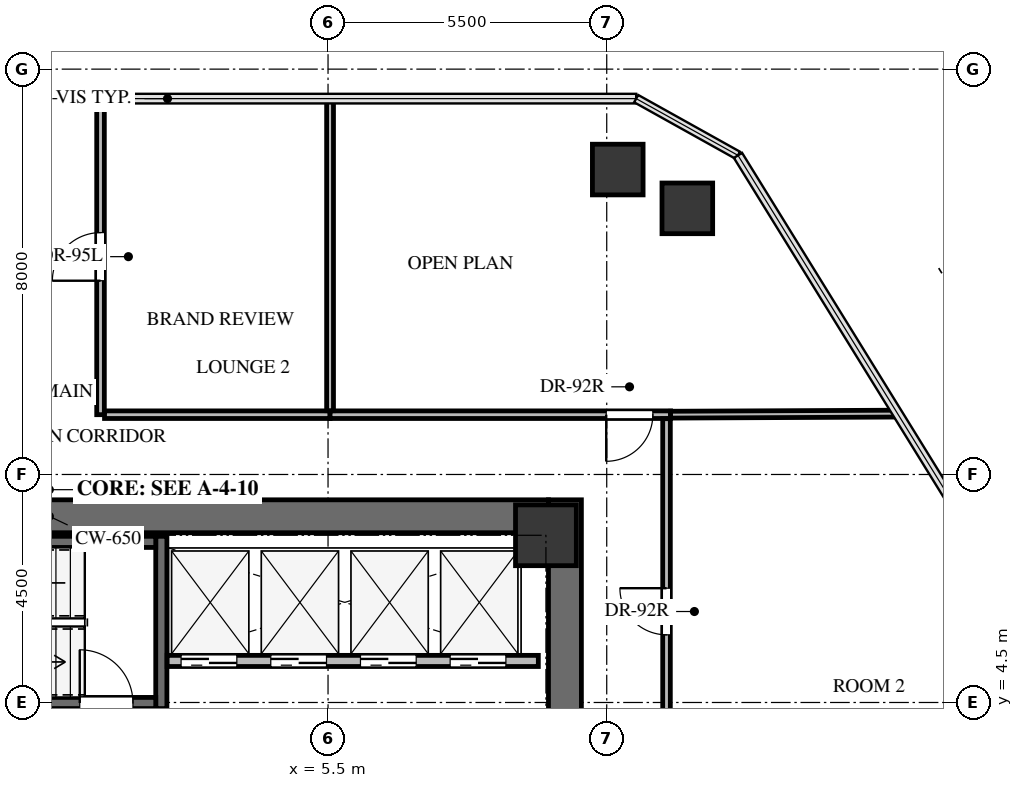
"""IFC4 building model, lengths in metres.
Left out: names, types, materials, properties, quantities, classifications, styles, units other than length and angle.
Written with IfcOpenShell. Run it as: python <this file> out.ifc"""

import sys

from ifc_helpers import new_model, si_unit, direction, frame, frame_2d, origin, origin_2d, place, context, subcontext, project, spatial, rectangle, extrude, source, transform, mapped, element, fill, save


model = new_model("IFC4")
c1 = context("Model", 3, precision=1e-05, world=origin(), true_north=direction((0.0, 1.0)))
c2 = subcontext(c1, "Body", "Model", "MODEL_VIEW")
j1 = project(units=[si_unit("LENGTHUNIT", "METRE"), si_unit("PLANEANGLEUNIT", "RADIAN")], contexts=[c1])
p1 = place(None, origin())
s1 = spatial("IfcSite", under=j1, at=p1, CompositionType="ELEMENT")
p2 = place(p1, origin())
s2 = spatial("IfcBuilding", under=s1, at=p2, CompositionType="ELEMENT")
p3 = place(p2, frame((0.0, 0.0, 190.3)))
s3 = spatial("IfcBuildingStorey", under=s2, at=p3, CompositionType="ELEMENT", Elevation=190.3)
p4 = place(p3, frame((10.175, -8.5, 0.0), z_axis=(0.0, 0.0, 1.0), x_axis=(0.0, 1.0, 0.0)))
e1 = element("IfcWall", 1, at=p4, inside=s3, PredefinedType="SHEAR", context=c2, shape_type="SweptSolid", body=[
    extrude(rectangle(XDim=17.0, YDim=0.65, at=frame_2d((8.5, 0.0))), origin(), (0.0, 0.0, 1.0), 3.3),
])
p5 = place(p3, frame((-9.85, 8.175, 0.0), z_axis=(0.0, 0.0, 1.0), x_axis=(1.0, 0.0, 0.0)))
e2 = element("IfcWall", 2, at=p5, inside=s3, PredefinedType="SHEAR", context=c2, shape_type="SweptSolid", body=[
    extrude(rectangle(XDim=19.7, YDim=0.65, at=frame_2d((9.85, 0.0))), origin(), (0.0, 0.0, 1.0), 3.3),
])
p6 = place(p3, frame((2.21, 4.38, -0.24), z_axis=(0.0, 0.0, 1.0), x_axis=(0.0, 1.0, 0.0)))
e3 = element("IfcWall", 3, at=p6, inside=s3, PredefinedType="SHEAR", context=c2, shape_type="SweptSolid", body=[
    extrude(rectangle(XDim=3.4, YDim=0.22, at=frame_2d((1.7, 0.0))), origin(), (0.0, 0.0, 1.0), 3.3),
])
p7 = place(p3, frame((-5.25, 4.49, -0.24), z_axis=(0.0, 0.0, 1.0), x_axis=(1.0, 0.0, 0.0)))
e4 = element("IfcWall", 4, at=p7, inside=s3, PredefinedType="SHEAR", context=c2, shape_type="SweptSolid", body=[
    extrude(rectangle(XDim=7.35, YDim=0.22, at=frame_2d((3.675, 0.0))), origin(), (0.0, 0.0, 1.0), 3.3),
])
p8 = place(p7, frame((5.85, 0.0, 0.0)))
e5 = element("IfcOpeningElement", 5, at=p8, cuts=e4, PredefinedType="OPENING", context=c2, shape_type="SweptSolid", body=[
    extrude(rectangle(XDim=1.05, YDim=2.15, at=frame_2d((0.525, 1.075))), frame((0.0, 0.12, 0.0), z_axis=(0.0, -1.0, 0.0), x_axis=(1.0, 0.0, 0.0)), (0.0, 0.0, 1.0), 0.24),
])
p9 = place(p3, frame((2.1, 7.67, -0.24), z_axis=(0.0, 0.0, 1.0), x_axis=(-1.0, 0.0, 0.0)))
e6 = element("IfcWall", 6, at=p9, inside=s3, PredefinedType="SHEAR", context=c2, shape_type="SweptSolid", body=[
    extrude(rectangle(XDim=7.35, YDim=0.22, at=frame_2d((3.675, 0.0))), origin(), (0.0, 0.0, 1.0), 3.3),
])
m1 = source(origin(), c2, "Body", "SweptSolid", [
    extrude(rectangle(XDim=1.2, YDim=1.2, at=origin_2d()), origin(), (0.0, 0.0, 1.0), 3.3),
])
p10 = place(p3, frame((9.8, 7.8, -0.24), z_axis=(0.0, 0.0, 1.0), x_axis=(1.0, 0.0, 0.0)))
e7 = element("IfcColumn", 7, at=p10, inside=s3, PredefinedType="COLUMN", context=c2, shape_type="MappedRepresentation", body=[
    mapped(m1, transform((0.0, 0.0, 0.0), x_axis=(1.0, 0.0, 0.0), y_axis=(0.0, 1.0, 0.0), z_axis=(0.0, 0.0, 1.0), scale=1.0)),
])
m2 = source(origin(), c2, "Body", "SweptSolid", [
    extrude(rectangle(XDim=1.0, YDim=1.0, at=origin_2d()), origin(), (0.0, 0.0, 1.0), 3.3),
])
for number, where, z_axis, x_axis in (
    (8, (11.218, 15.018, -0.24), (0.0, 0.0, 1.0), (1.0, 0.0, 0.0)),
    (9, (12.591, 14.252, -0.24), (0.0, 0.0, 1.0), (1.0, 0.0, 0.0)),
):
    element("IfcColumn", number, at=place(p3, frame(where, z_axis=z_axis, x_axis=x_axis)), inside=s3, PredefinedType="COLUMN", context=c2, shape_type="MappedRepresentation", body=[
        mapped(m2, transform((0.0, 0.0, 0.0), x_axis=(1.0, 0.0, 0.0), y_axis=(0.0, 1.0, 0.0), z_axis=(0.0, 0.0, 1.0), scale=1.0)),
    ])
p11 = place(p3, frame((2.325, 5.32, 0.0), z_axis=(0.0, 0.0, 1.0), x_axis=(1.0, 0.0, 0.0)))
e10 = element("IfcWall", 10, at=p11, inside=s3, PredefinedType="SOLIDWALL", context=c2, shape_type="SweptSolid", body=[
    extrude(rectangle(XDim=7.325, YDim=0.22, at=frame_2d((3.663, 0.0))), origin(), (0.0, 0.0, 1.0), 3.045),
])
p12 = place(p11, frame((0.275, 0.0, 0.0)))
e11 = element("IfcOpeningElement", 11, at=p12, cuts=e10, PredefinedType="OPENING", context=c2, shape_type="SweptSolid", body=[
    extrude(rectangle(XDim=1.1, YDim=2.15, at=frame_2d((0.55, 1.075))), frame((0.0, 0.12, 0.0), z_axis=(0.0, -1.0, 0.0), x_axis=(1.0, 0.0, 0.0)), (0.0, 0.0, 1.0), 0.24),
])
p13 = place(p11, frame((2.045, 0.0, 0.0)))
e12 = element("IfcOpeningElement", 12, at=p13, cuts=e10, PredefinedType="OPENING", context=c2, shape_type="SweptSolid", body=[
    extrude(rectangle(XDim=1.1, YDim=2.15, at=frame_2d((0.55, 1.075))), frame((0.0, 0.12, 0.0), z_axis=(0.0, -1.0, 0.0), x_axis=(1.0, 0.0, 0.0)), (0.0, 0.0, 1.0), 0.24),
])
p14 = place(p11, frame((3.815, 0.0, 0.0)))
e13 = element("IfcOpeningElement", 13, at=p14, cuts=e10, PredefinedType="OPENING", context=c2, shape_type="SweptSolid", body=[
    extrude(rectangle(XDim=1.1, YDim=2.15, at=frame_2d((0.55, 1.075))), frame((0.0, 0.12, 0.0), z_axis=(0.0, -1.0, 0.0), x_axis=(1.0, 0.0, 0.0)), (0.0, 0.0, 1.0), 0.24),
])
p15 = place(p11, frame((5.585, 0.0, 0.0)))
e14 = element("IfcOpeningElement", 14, at=p15, cuts=e10, PredefinedType="OPENING", context=c2, shape_type="SweptSolid", body=[
    extrude(rectangle(XDim=1.1, YDim=2.15, at=frame_2d((0.55, 1.075))), frame((0.0, 0.12, 0.0), z_axis=(0.0, -1.0, 0.0), x_axis=(1.0, 0.0, 0.0)), (0.0, 0.0, 1.0), 0.24),
])
p16 = place(p3, frame((1.01, 10.18, 0.0), z_axis=(0.0, 0.0, 1.0), x_axis=(0.0, 1.0, 0.0)))
e15 = element("IfcWall", 15, at=p16, inside=s3, PredefinedType="PARTITIONING", context=c2, shape_type="SweptSolid", body=[
    extrude(rectangle(XDim=6.238, YDim=0.15, at=frame_2d((3.119, 0.0))), origin(), (0.0, 0.0, 1.0), 2.399),
])
p17 = place(p16, frame((2.644, 0.0, 0.0)))
e16 = element("IfcOpeningElement", 16, at=p17, cuts=e15, PredefinedType="OPENING", context=c2, shape_type="SweptSolid", body=[
    extrude(rectangle(XDim=0.95, YDim=2.1, at=frame_2d((0.475, 1.05))), frame((0.0, 0.085, 0.0), z_axis=(0.0, -1.0, 0.0), x_axis=(1.0, 0.0, 0.0)), (0.0, 0.0, 1.0), 0.17),
])
p18 = place(p3, frame((5.54, 10.18, 0.0), z_axis=(0.0, 0.0, 1.0), x_axis=(-1.0, 0.0, 0.0)))
e17 = element("IfcWall", 17, at=p18, inside=s3, PredefinedType="PARTITIONING", context=c2, shape_type="SweptSolid", body=[
    extrude(rectangle(XDim=4.451, YDim=0.15, at=frame_2d((2.226, 0.0))), origin(), (0.0, 0.0, 1.0), 2.608),
])
p19 = place(p3, frame((12.26, 10.18, 0.0), z_axis=(0.0, 0.0, 1.0), x_axis=(-1.0, 0.0, 0.0)))
e18 = element("IfcWall", 18, at=p19, inside=s3, PredefinedType="PARTITIONING", context=c2, shape_type="SweptSolid", body=[
    extrude(rectangle(XDim=6.72, YDim=0.15, at=frame_2d((3.36, 0.0))), origin(), (0.0, 0.0, 1.0), 2.242),
])
p20 = place(p19, frame((0.35, 0.0, 0.0)))
e19 = element("IfcOpeningElement", 19, at=p20, cuts=e18, PredefinedType="OPENING", context=c2, shape_type="SweptSolid", body=[
    extrude(rectangle(XDim=0.92, YDim=2.1, at=frame_2d((0.46, 1.05))), frame((0.0, 0.085, 0.0), z_axis=(0.0, -1.0, 0.0), x_axis=(1.0, 0.0, 0.0)), (0.0, 0.0, 1.0), 0.17),
])
p21 = place(p3, frame((12.18, 2.49, 0.0), z_axis=(0.0, 0.0, 1.0), x_axis=(0.0, 1.0, 0.0)))
e20 = element("IfcWall", 20, at=p21, inside=s3, PredefinedType="PARTITIONING", context=c2, shape_type="SweptSolid", body=[
    extrude(rectangle(XDim=7.611, YDim=0.15, at=frame_2d((3.806, 0.0))), origin(), (0.0, 0.0, 1.0), 3.045),
])
p22 = place(p21, frame((3.345, 0.0, 0.0)))
e21 = element("IfcOpeningElement", 21, at=p22, cuts=e20, PredefinedType="OPENING", context=c2, shape_type="SweptSolid", body=[
    extrude(rectangle(XDim=0.92, YDim=2.1, at=frame_2d((0.46, 1.05))), frame((0.0, 0.085, 0.0), z_axis=(0.0, -1.0, 0.0), x_axis=(1.0, 0.0, 0.0)), (0.0, 0.0, 1.0), 0.17),
])
p23 = place(p3, frame((5.54, 16.418, 0.0), z_axis=(0.0, 0.0, 1.0), x_axis=(0.0, -1.0, 0.0)))
e22 = element("IfcWall", 22, at=p23, inside=s3, PredefinedType="PARTITIONING", context=c2, shape_type="SweptSolid", body=[
    extrude(rectangle(XDim=6.159, YDim=0.135, at=frame_2d((3.08, 0.0))), origin(), (0.0, 0.0, 1.0), 2.399),
])
p24 = place(p3, frame((16.74, 10.201, 0.0), z_axis=(0.0, 0.0, 1.0), x_axis=(-0.999989522694, -0.004577608714, 0.0)))
e23 = element("IfcWall", 23, at=p24, inside=s3, PredefinedType="PARTITIONING", context=c2, shape_type="SweptSolid", body=[
    extrude(rectangle(XDim=4.48, YDim=0.135, at=frame_2d((2.24, 0.0))), origin(), (0.0, 0.0, 1.0), 2.399),
])
m3 = source(origin(), c2, "Body", "SweptSolid", [
    extrude(rectangle(XDim=1.05, YDim=2.15, at=frame_2d((0.525, 1.075))), frame((0.0, 0.025, 0.0), z_axis=(0.0, -1.0, 0.0), x_axis=(1.0, 0.0, 0.0)), (0.0, 0.0, 1.0), 0.05),
])
p25 = place(p8, origin())
e24 = element("IfcDoor", 24, at=p25, inside=s3, OperationType="SINGLE_SWING_LEFT", PredefinedType="DOOR", context=c2, shape_type="MappedRepresentation", body=[
    mapped(m3, transform((0.0, 0.0, 0.0), x_axis=(1.0, 0.0, 0.0), y_axis=(0.0, 1.0, 0.0), z_axis=(0.0, 0.0, 1.0), scale=1.0)),
])
fill(e5, e24)
m4 = source(origin(), c2, "Body", "SweptSolid", [
    extrude(rectangle(XDim=1.1, YDim=2.15, at=frame_2d((0.55, 1.075))), frame((0.0, 0.025, 0.0), z_axis=(0.0, -1.0, 0.0), x_axis=(1.0, 0.0, 0.0)), (0.0, 0.0, 1.0), 0.05),
])
p26 = place(p12, origin())
e25 = element("IfcDoor", 25, at=p26, inside=s3, OperationType="DOUBLE_DOOR_SLIDING", PredefinedType="DOOR", context=c2, shape_type="MappedRepresentation", body=[
    mapped(m4, transform((0.0, 0.0, 0.0), x_axis=(1.0, 0.0, 0.0), y_axis=(0.0, 1.0, 0.0), z_axis=(0.0, 0.0, 1.0), scale=1.0)),
])
fill(e11, e25)
p27 = place(p13, origin())
e26 = element("IfcDoor", 26, at=p27, inside=s3, OperationType="DOUBLE_DOOR_SLIDING", PredefinedType="DOOR", context=c2, shape_type="MappedRepresentation", body=[
    mapped(m4, transform((0.0, 0.0, 0.0), x_axis=(1.0, 0.0, 0.0), y_axis=(0.0, 1.0, 0.0), z_axis=(0.0, 0.0, 1.0), scale=1.0)),
])
fill(e12, e26)
p28 = place(p14, origin())
e27 = element("IfcDoor", 27, at=p28, inside=s3, OperationType="DOUBLE_DOOR_SLIDING", PredefinedType="DOOR", context=c2, shape_type="MappedRepresentation", body=[
    mapped(m4, transform((0.0, 0.0, 0.0), x_axis=(1.0, 0.0, 0.0), y_axis=(0.0, 1.0, 0.0), z_axis=(0.0, 0.0, 1.0), scale=1.0)),
])
fill(e13, e27)
p29 = place(p15, origin())
e28 = element("IfcDoor", 28, at=p29, inside=s3, OperationType="DOUBLE_DOOR_SLIDING", PredefinedType="DOOR", context=c2, shape_type="MappedRepresentation", body=[
    mapped(m4, transform((0.0, 0.0, 0.0), x_axis=(1.0, 0.0, 0.0), y_axis=(0.0, 1.0, 0.0), z_axis=(0.0, 0.0, 1.0), scale=1.0)),
])
fill(e14, e28)
m5 = source(origin(), c2, "Body", "SweptSolid", [
    extrude(rectangle(XDim=0.95, YDim=2.1, at=frame_2d((0.475, 1.05))), frame((0.0, 0.025, 0.0), z_axis=(0.0, -1.0, 0.0), x_axis=(1.0, 0.0, 0.0)), (0.0, 0.0, 1.0), 0.05),
])
p30 = place(p17, origin())
e29 = element("IfcDoor", 29, at=p30, inside=s3, OperationType="SINGLE_SWING_LEFT", PredefinedType="DOOR", context=c2, shape_type="MappedRepresentation", body=[
    mapped(m5, transform((0.0, 0.0, 0.0), x_axis=(1.0, 0.0, 0.0), y_axis=(0.0, 1.0, 0.0), z_axis=(0.0, 0.0, 1.0), scale=1.0)),
])
fill(e16, e29)
m6 = source(origin(), c2, "Body", "SweptSolid", [
    extrude(rectangle(XDim=0.92, YDim=2.1, at=frame_2d((0.46, 1.05))), frame((0.0, 0.025, 0.0), z_axis=(0.0, -1.0, 0.0), x_axis=(1.0, 0.0, 0.0)), (0.0, 0.0, 1.0), 0.05),
])
p31 = place(p20, origin())
e30 = element("IfcDoor", 30, at=p31, inside=s3, OperationType="SINGLE_SWING_RIGHT", PredefinedType="DOOR", context=c2, shape_type="MappedRepresentation", body=[
    mapped(m6, transform((0.0, 0.0, 0.0), x_axis=(1.0, 0.0, 0.0), y_axis=(0.0, 1.0, 0.0), z_axis=(0.0, 0.0, 1.0), scale=1.0)),
])
fill(e19, e30)
p32 = place(p22, origin())
e31 = element("IfcDoor", 31, at=p32, inside=s3, OperationType="SINGLE_SWING_RIGHT", PredefinedType="DOOR", context=c2, shape_type="MappedRepresentation", body=[
    mapped(m6, transform((0.0, 0.0, 0.0), x_axis=(1.0, 0.0, 0.0), y_axis=(0.0, 1.0, 0.0), z_axis=(0.0, 0.0, 1.0), scale=1.0)),
])
fill(e21, e31)
save(model, sys.argv[1])
